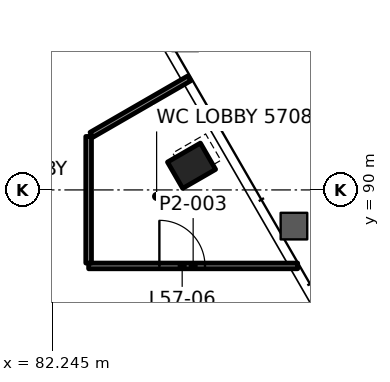
"""IFC4 building model, lengths in metres.
Left out: names, types, materials, properties, quantities, classifications, styles, units other than length and angle.
Written with IfcOpenShell. Run it as: python <this file> out.ifc"""

import sys

from ifc_helpers import new_model, si_unit, direction, frame, frame_2d, origin, origin_2d, place, context, subcontext, project, spatial, rectangle, hollow_rectangle, extrude, element, fill, save


model = new_model("IFC4")
c1 = context("Model", 3, precision=1e-05, world=origin(), true_north=direction((0.0, 1.0)))
c2 = subcontext(c1, "Body", "Model", "MODEL_VIEW")
j1 = project(units=[si_unit("LENGTHUNIT", "METRE"), si_unit("PLANEANGLEUNIT", "RADIAN")], contexts=[c1])
p1 = place(None, origin())
s1 = spatial("IfcSite", under=j1, at=p1, CompositionType="ELEMENT")
p2 = place(p1, origin())
s2 = spatial("IfcBuilding", under=s1, at=p2, CompositionType="ELEMENT")
p3 = place(p2, frame((0.0, 0.0, 241.6)))
s3 = spatial("IfcBuildingStorey", under=s2, at=p3, CompositionType="ELEMENT", Elevation=241.6)
p4 = place(p3, frame((85.908, 90.636, -0.0), z_axis=(0.0, 0.0, 1.0), x_axis=(-0.5, 0.866025403784, 0.0)))
e1 = element("IfcColumn", 1, at=p4, inside=s3, PredefinedType="COLUMN", context=c2, shape_type="SweptSolid", body=[
    extrude(hollow_rectangle(XDim=0.8, YDim=1.0, WallThickness=0.05, at=origin_2d()), origin(), (0.0, 0.0, 1.0), 6.0),
])
p5 = place(p3, frame((83.2, 88.0, 0.0), z_axis=(0.0, 0.0, 1.0), x_axis=(1.0, 0.0, 0.0)))
e2 = element("IfcWall", 2, at=p5, inside=s3, PredefinedType="PARTITIONING", context=c2, shape_type="SweptSolid", body=[
    extrude(rectangle(XDim=5.5, YDim=0.15, at=frame_2d((2.75, 0.0))), origin(), (0.0, 0.0, 1.0), 4.872),
])
p6 = place(p5, frame((1.862, 0.0, 0.0)))
e3 = element("IfcOpeningElement", 3, at=p6, cuts=e2, PredefinedType="OPENING", context=c2, shape_type="SweptSolid", body=[
    extrude(rectangle(XDim=1.2, YDim=2.1, at=frame_2d((0.6, 1.05))), frame((0.0, 0.085, 0.0), z_axis=(0.0, -1.0, 0.0), x_axis=(1.0, 0.0, 0.0)), (0.0, 0.0, 1.0), 0.17),
])
p7 = place(p3, frame((83.275, 91.451, 0.0), z_axis=(0.0, 0.0, 1.0), x_axis=(0.866016014115, 0.500016263033, 0.0)))
e4 = element("IfcWall", 4, at=p7, inside=s3, PredefinedType="PARTITIONING", context=c2, shape_type="SweptSolid", body=[
    extrude(rectangle(XDim=2.973, YDim=0.15, at=frame_2d((1.487, 0.0))), origin(), (0.0, 0.0, 1.0), 4.872),
])
p8 = place(p3, frame((83.2, 88.075, 0.0), z_axis=(0.0, 0.0, 1.0), x_axis=(0.0, 1.0, 0.0)))
e5 = element("IfcWall", 5, at=p8, inside=s3, PredefinedType="PARTITIONING", context=c2, shape_type="SweptSolid", body=[
    extrude(rectangle(XDim=3.333, YDim=0.15, at=frame_2d((1.666, 0.0))), origin(), (0.0, 0.0, 1.0), 4.95),
])
p9 = place(p6, origin())
e6 = element("IfcDoor", 6, at=p9, inside=s3, OperationType="DOUBLE_DOOR_SINGLE_SWING", PredefinedType="DOOR", context=c2, shape_type="SweptSolid", body=[
    extrude(rectangle(XDim=1.2, YDim=2.1, at=frame_2d((0.6, 1.05))), frame((0.0, 0.025, 0.0), z_axis=(0.0, -1.0, 0.0), x_axis=(1.0, 0.0, 0.0)), (0.0, 0.0, 1.0), 0.05),
])
fill(e3, e6)
save(model, sys.argv[1])
